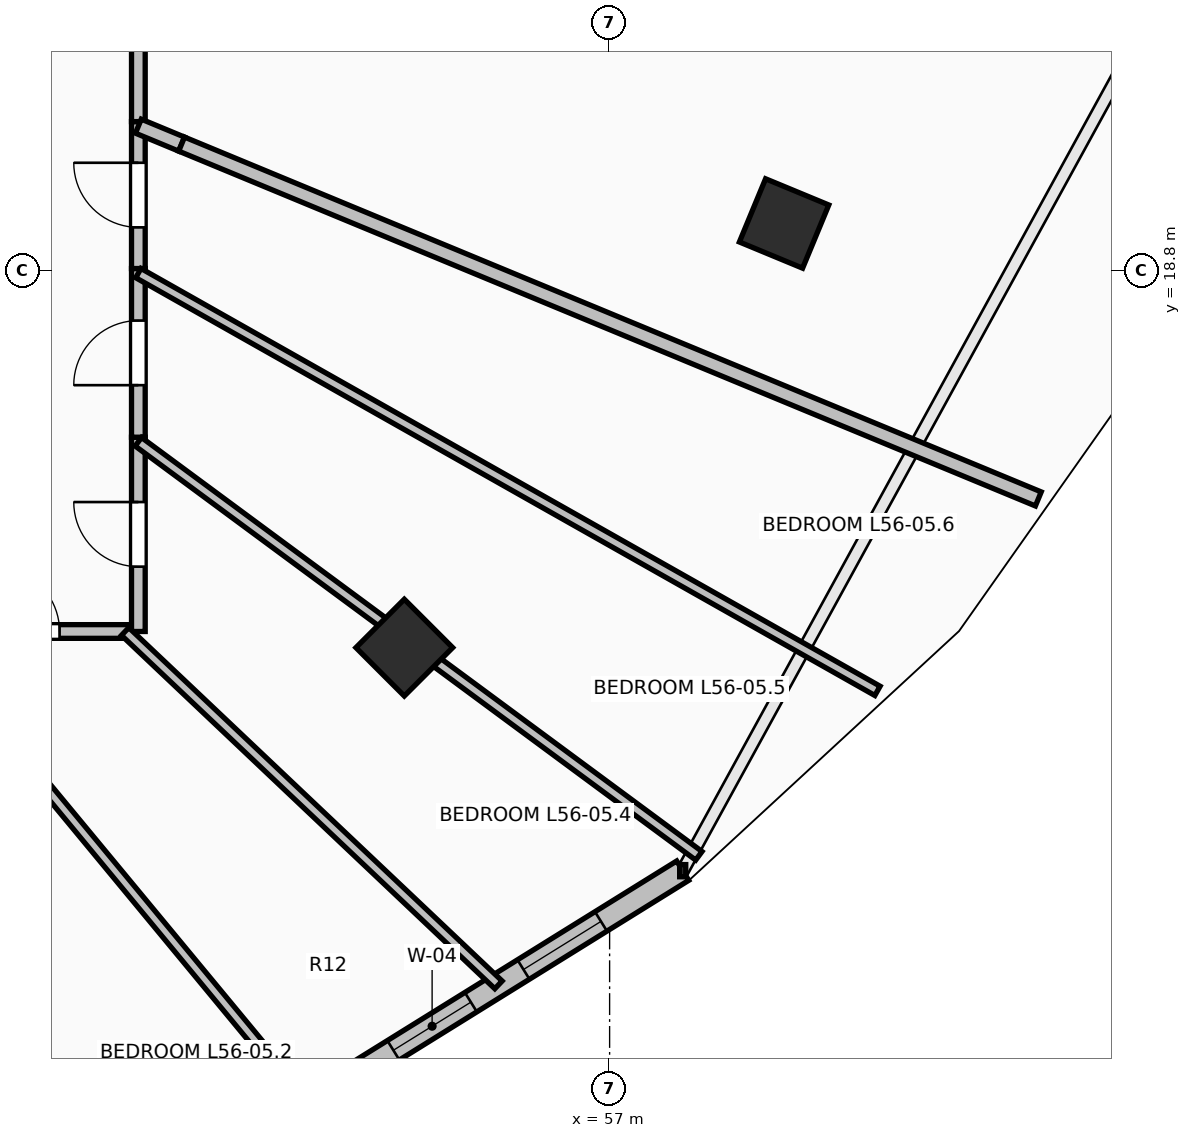
"""IFC4 building model, lengths in metres.
Left out: names, types, materials, properties, quantities, classifications, styles, units other than length and angle.
Written with IfcOpenShell. Run it as: python <this file> out.ifc"""

import sys

from ifc_helpers import new_model, si_unit, direction, frame, frame_2d, origin, origin_2d, place, context, subcontext, project, spatial, rectangle, extrude, element, fill, save


model = new_model("IFC4")
c1 = context("Model", 3, precision=1e-05, world=origin(), true_north=direction((0.0, 1.0)))
c2 = subcontext(c1, "Body", "Model", "MODEL_VIEW")
j1 = project(units=[si_unit("LENGTHUNIT", "METRE"), si_unit("PLANEANGLEUNIT", "RADIAN")], contexts=[c1])
p1 = place(None, origin())
s1 = spatial("IfcSite", under=j1, at=p1, CompositionType="ELEMENT")
p2 = place(p1, origin())
s2 = spatial("IfcBuilding", under=s1, at=p2, CompositionType="ELEMENT")
p3 = place(p2, frame((0.0, 0.0, 207.2)))
s3 = spatial("IfcBuildingStorey", under=s2, at=p3, CompositionType="ELEMENT", Elevation=207.2)
for number, where, z_axis, x_axis in (
    (1, (54.299, 13.838, 0.0), (0.0, 0.0, 1.0), (0.707, -0.707, 0.0)),
    (2, (59.295, 19.418, 0.0), (0.0, 0.0, 1.0), (0.924, -0.383, 0.0)),
):
    element("IfcColumn", number, at=place(p3, frame(where, z_axis=z_axis, x_axis=x_axis)), inside=s3, PredefinedType="COLUMN", context=c2, shape_type="SweptSolid", body=[
        extrude(rectangle(XDim=0.9, YDim=0.9, at=origin_2d()), origin(), (0.0, 0.0, 1.0), 3.55),
    ])
p4 = place(p3, frame((53.684, 8.248, 0.0), z_axis=(0.0, 0.0, 1.0), x_axis=(0.849647657754, 0.527350791858, 0.0)))
e3 = element("IfcWall", 3, at=p4, inside=s3, PredefinedType="STANDARD", context=c2, shape_type="SweptSolid", body=[
    extrude(rectangle(XDim=5.035, YDim=0.3, at=frame_2d((2.518, 0.0))), origin(), (0.0, 0.0, 1.0), 3.29),
])
p5 = place(p4, frame((0.555, 0.0, 0.85)))
e4 = element("IfcOpeningElement", 4, at=p5, cuts=e3, PredefinedType="OPENING", context=c2, shape_type="SweptSolid", body=[
    extrude(rectangle(XDim=1.2, YDim=1.95, at=frame_2d((0.6, 0.975))), frame((0.0, 0.165, 0.0), z_axis=(0.0, -1.0, 0.0), x_axis=(1.0, 0.0, 0.0)), (0.0, 0.0, 1.0), 0.33),
])
p6 = place(p4, frame((2.569, 0.0, 0.85)))
e5 = element("IfcOpeningElement", 5, at=p6, cuts=e3, PredefinedType="OPENING", context=c2, shape_type="SweptSolid", body=[
    extrude(rectangle(XDim=1.2, YDim=1.95, at=frame_2d((0.6, 0.975))), frame((0.0, 0.165, 0.0), z_axis=(0.0, -1.0, 0.0), x_axis=(1.0, 0.0, 0.0)), (0.0, 0.0, 1.0), 0.33),
])
p7 = place(p3, frame((47.964, 14.05, 0.0), z_axis=(0.0, 0.0, 1.0), x_axis=(1.0, 0.0, 0.0)))
e6 = element("IfcWall", 6, at=p7, inside=s3, PredefinedType="PARTITIONING", context=c2, shape_type="SweptSolid", body=[
    extrude(rectangle(XDim=2.749, YDim=0.18, at=frame_2d((1.375, 0.0))), origin(), (0.0, 0.0, 1.0), 2.482),
])
p8 = place(p7, frame((0.949, 0.0, 0.0)))
e7 = element("IfcOpeningElement", 7, at=p8, cuts=e6, PredefinedType="OPENING", context=c2, shape_type="SweptSolid", body=[
    extrude(rectangle(XDim=0.85, YDim=2.1, at=frame_2d((0.425, 1.05))), frame((0.0, 0.105, 0.0), z_axis=(0.0, -1.0, 0.0), x_axis=(1.0, 0.0, 0.0)), (0.0, 0.0, 1.0), 0.21),
])
p9 = place(p3, frame((50.8, 14.05, 0.0), z_axis=(0.0, 0.0, 1.0), x_axis=(0.0, 1.0, 0.0)))
e8 = element("IfcWall", 8, at=p9, inside=s3, PredefinedType="PARTITIONING", context=c2, shape_type="SweptSolid", body=[
    extrude(rectangle(XDim=2.556, YDim=0.18, at=frame_2d((1.278, 0.0))), origin(), (0.0, 0.0, 1.0), 2.482),
])
p10 = place(p9, frame((0.853, 0.0, 0.0)))
e9 = element("IfcOpeningElement", 9, at=p10, cuts=e8, PredefinedType="OPENING", context=c2, shape_type="SweptSolid", body=[
    extrude(rectangle(XDim=0.85, YDim=2.1, at=frame_2d((0.425, 1.05))), frame((0.0, 0.105, 0.0), z_axis=(0.0, -1.0, 0.0), x_axis=(1.0, 0.0, 0.0)), (0.0, 0.0, 1.0), 0.21),
])
p11 = place(p3, frame((50.8, 16.606, 0.0), z_axis=(0.0, 0.0, 1.0), x_axis=(0.0, 1.0, 0.0)))
e10 = element("IfcWall", 10, at=p11, inside=s3, PredefinedType="PARTITIONING", context=c2, shape_type="SweptSolid", body=[
    extrude(rectangle(XDim=2.219, YDim=0.18, at=frame_2d((1.109, 0.0))), origin(), (0.0, 0.0, 1.0), 2.936),
])
p12 = place(p11, frame((0.685, 0.0, 0.0)))
e11 = element("IfcOpeningElement", 11, at=p12, cuts=e10, PredefinedType="OPENING", context=c2, shape_type="SweptSolid", body=[
    extrude(rectangle(XDim=0.85, YDim=2.1, at=frame_2d((0.425, 1.05))), frame((0.0, 0.105, 0.0), z_axis=(0.0, -1.0, 0.0), x_axis=(1.0, 0.0, 0.0)), (0.0, 0.0, 1.0), 0.21),
])
p13 = place(p3, frame((50.8, 18.825, 0.0), z_axis=(0.0, 0.0, 1.0), x_axis=(0.0, 1.0, 0.0)))
e12 = element("IfcWall", 12, at=p13, inside=s3, PredefinedType="PARTITIONING", context=c2, shape_type="SweptSolid", body=[
    extrude(rectangle(XDim=1.933, YDim=0.18, at=frame_2d((0.967, 0.0))), origin(), (0.0, 0.0, 1.0), 3.29),
])
p14 = place(p13, frame((0.542, 0.0, 0.0)))
e13 = element("IfcOpeningElement", 13, at=p14, cuts=e12, PredefinedType="OPENING", context=c2, shape_type="SweptSolid", body=[
    extrude(rectangle(XDim=0.85, YDim=2.1, at=frame_2d((0.425, 1.05))), frame((0.0, 0.105, 0.0), z_axis=(0.0, -1.0, 0.0), x_axis=(1.0, 0.0, 0.0)), (0.0, 0.0, 1.0), 0.21),
])
p15 = place(p3, frame((50.8, 20.758, 0.0), z_axis=(0.0, 0.0, 1.0), x_axis=(0.0, 1.0, 0.0)))
e14 = element("IfcWall", 14, at=p15, inside=s3, PredefinedType="PARTITIONING", context=c2, shape_type="SweptSolid", body=[
    extrude(rectangle(XDim=3.792, YDim=0.18, at=frame_2d((1.896, 0.0))), origin(), (0.0, 0.0, 1.0), 3.29),
])
p16 = place(p3, frame((50.251, 6.862, 0.0), z_axis=(0.0, 0.0, 1.0), x_axis=(-0.539117012224, 0.842230875194, 0.0)))
e15 = element("IfcWall", 15, at=p16, inside=s3, PredefinedType="PARTITIONING", context=c2, shape_type="SweptSolid", body=[
    extrude(rectangle(XDim=8.534, YDim=0.14, at=frame_2d((4.267, 0.0))), origin(), (0.0, 0.0, 1.0), 2.482),
])
p17 = place(p3, frame((52.934, 7.948, 0.0), z_axis=(0.0, 0.0, 1.0), x_axis=(-0.637427009283, 0.77051074479, 0.0)))
e16 = element("IfcWall", 16, at=p17, inside=s3, PredefinedType="PARTITIONING", context=c2, shape_type="SweptSolid", body=[
    extrude(rectangle(XDim=7.919, YDim=0.14, at=frame_2d((3.96, 0.0))), origin(), (0.0, 0.0, 1.0), 2.482),
])
p18 = place(p3, frame((55.538, 9.401, 0.0), z_axis=(0.0, 0.0, 1.0), x_axis=(-0.726277952769, 0.687401145854, 0.0)))
e17 = element("IfcWall", 17, at=p18, inside=s3, PredefinedType="PARTITIONING", context=c2, shape_type="SweptSolid", body=[
    extrude(rectangle(XDim=6.763, YDim=0.14, at=frame_2d((3.382, 0.0))), origin(), (0.0, 0.0, 1.0), 2.824),
])
p19 = place(p3, frame((58.174, 11.099, 0.0), z_axis=(0.0, 0.0, 1.0), x_axis=(-0.804363169868, 0.594137939338, 0.0)))
e18 = element("IfcWall", 18, at=p19, inside=s3, PredefinedType="PARTITIONING", context=c2, shape_type="SweptSolid", body=[
    extrude(rectangle(XDim=9.167, YDim=0.14, at=frame_2d((4.584, 0.0))), origin(), (0.0, 0.0, 1.0), 2.482),
])
p20 = place(p3, frame((60.524, 13.269, 0.0), z_axis=(0.0, 0.0, 1.0), x_axis=(-0.870572608778, 0.49203997078, 0.0)))
e19 = element("IfcWall", 19, at=p20, inside=s3, PredefinedType="PARTITIONING", context=c2, shape_type="SweptSolid", body=[
    extrude(rectangle(XDim=11.169, YDim=0.14, at=frame_2d((5.585, 0.0))), origin(), (0.0, 0.0, 1.0), 2.824),
])
p21 = place(p3, frame((51.369, 20.462, 0.0), z_axis=(0.0, 0.0, 1.0), x_axis=(-0.923615496363, 0.383320251066, 0.0)))
e20 = element("IfcWall", 20, at=p21, inside=s3, PredefinedType="PARTITIONING", context=c2, shape_type="SweptSolid", body=[
    extrude(rectangle(XDim=0.616, YDim=0.2, at=frame_2d((0.308, 0.0))), origin(), (0.0, 0.0, 1.0), 2.936),
])
p22 = place(p3, frame((62.64, 15.794, 0.0), z_axis=(0.0, 0.0, 1.0), x_axis=(-0.923897809723, 0.382639304291, 0.0)))
e21 = element("IfcWall", 21, at=p22, inside=s3, PredefinedType="PARTITIONING", context=c2, shape_type="SweptSolid", body=[
    extrude(rectangle(XDim=12.199, YDim=0.2, at=frame_2d((6.1, 0.0))), origin(), (0.0, 0.0, 1.0), 2.824),
])
p23 = place(p5, origin())
e22 = element("IfcWindow", 22, at=p23, inside=s3, PartitioningType="SINGLE_PANEL", PredefinedType="WINDOW", context=c2, shape_type="SweptSolid", body=[
    extrude(rectangle(XDim=1.2, YDim=1.95, at=frame_2d((0.6, 0.975))), frame((0.0, 0.03, 0.0), z_axis=(0.0, -1.0, 0.0), x_axis=(1.0, 0.0, 0.0)), (0.0, 0.0, 1.0), 0.06),
])
fill(e4, e22)
p24 = place(p6, origin())
e23 = element("IfcWindow", 23, at=p24, inside=s3, PartitioningType="SINGLE_PANEL", PredefinedType="WINDOW", context=c2, shape_type="SweptSolid", body=[
    extrude(rectangle(XDim=1.2, YDim=1.95, at=frame_2d((0.6, 0.975))), frame((0.0, 0.03, 0.0), z_axis=(0.0, -1.0, 0.0), x_axis=(1.0, 0.0, 0.0)), (0.0, 0.0, 1.0), 0.06),
])
fill(e5, e23)
p25 = place(p8, origin())
e24 = element("IfcDoor", 24, at=p25, inside=s3, OperationType="SINGLE_SWING_LEFT", PredefinedType="DOOR", context=c2, shape_type="SweptSolid", body=[
    extrude(rectangle(XDim=0.85, YDim=2.1, at=frame_2d((0.425, 1.05))), frame((0.0, 0.025, 0.0), z_axis=(0.0, -1.0, 0.0), x_axis=(1.0, 0.0, 0.0)), (0.0, 0.0, 1.0), 0.05),
])
fill(e7, e24)
p26 = place(p10, origin())
e25 = element("IfcDoor", 25, at=p26, inside=s3, OperationType="SINGLE_SWING_RIGHT", PredefinedType="DOOR", context=c2, shape_type="SweptSolid", body=[
    extrude(rectangle(XDim=0.85, YDim=2.1, at=frame_2d((0.425, 1.05))), frame((0.0, 0.025, 0.0), z_axis=(0.0, -1.0, 0.0), x_axis=(1.0, 0.0, 0.0)), (0.0, 0.0, 1.0), 0.05),
])
fill(e9, e25)
p27 = place(p12, origin())
e26 = element("IfcDoor", 26, at=p27, inside=s3, OperationType="SINGLE_SWING_LEFT", PredefinedType="DOOR", context=c2, shape_type="SweptSolid", body=[
    extrude(rectangle(XDim=0.85, YDim=2.1, at=frame_2d((0.425, 1.05))), frame((0.0, 0.025, 0.0), z_axis=(0.0, -1.0, 0.0), x_axis=(1.0, 0.0, 0.0)), (0.0, 0.0, 1.0), 0.05),
])
fill(e11, e26)
p28 = place(p14, origin())
e27 = element("IfcDoor", 27, at=p28, inside=s3, OperationType="SINGLE_SWING_RIGHT", PredefinedType="DOOR", context=c2, shape_type="SweptSolid", body=[
    extrude(rectangle(XDim=0.85, YDim=2.1, at=frame_2d((0.425, 1.05))), frame((0.0, 0.025, 0.0), z_axis=(0.0, -1.0, 0.0), x_axis=(1.0, 0.0, 0.0)), (0.0, 0.0, 1.0), 0.05),
])
fill(e13, e27)
save(model, sys.argv[1])
